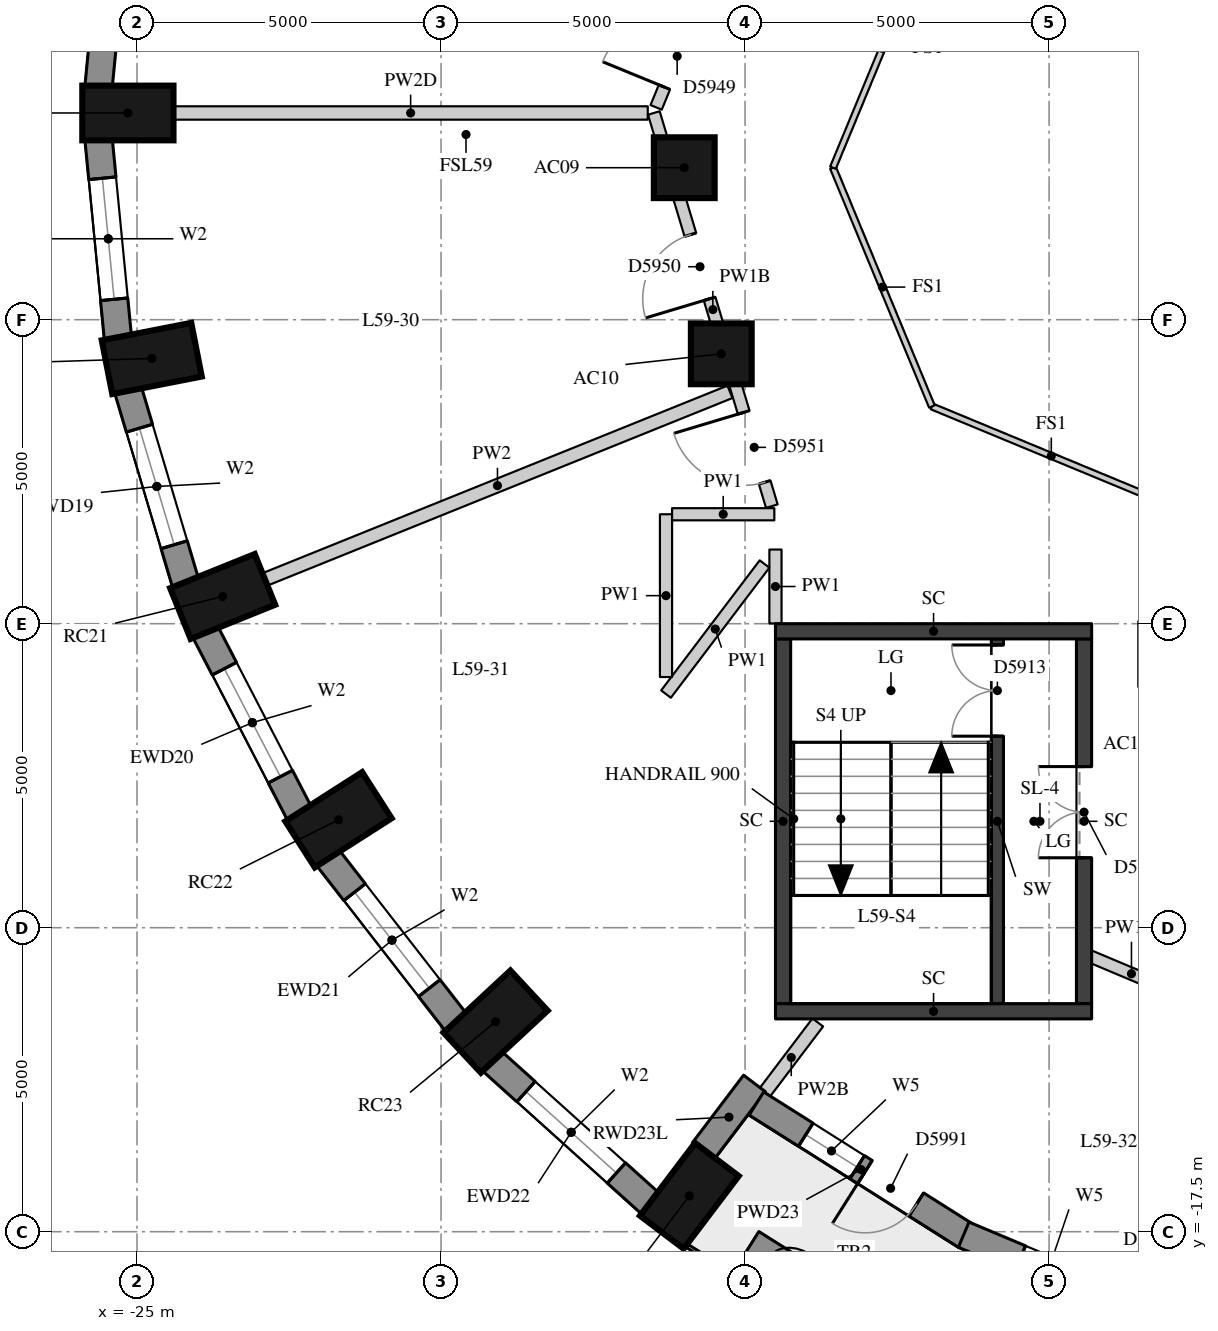
"""IFC4 building model, lengths in metres.
Left out: names, types, materials, properties, quantities, classifications, styles, units other than length and angle.
Written with IfcOpenShell. Run it as: python <this file> out.ifc"""

import sys

from ifc_helpers import new_model, si_unit, direction, frame, frame_2d, origin, origin_2d, place, context, subcontext, project, spatial, rectangle, extrude, element, fill, save


model = new_model("IFC4")
c1 = context("Model", 3, precision=1e-05, world=origin(), true_north=direction((0.0, 1.0)))
c2 = subcontext(c1, "Body", "Model", "MODEL_VIEW")
j1 = project(units=[si_unit("LENGTHUNIT", "METRE"), si_unit("PLANEANGLEUNIT", "RADIAN")], contexts=[c1])
p1 = place(None, origin())
s1 = spatial("IfcSite", under=j1, at=p1, CompositionType="ELEMENT")
p2 = place(p1, origin())
s2 = spatial("IfcBuilding", under=s1, at=p2, CompositionType="ELEMENT")
p3 = place(p2, frame((0.0, 0.0, 209.0)))
s3 = spatial("IfcBuildingStorey", under=s2, at=p3, CompositionType="ELEMENT", Elevation=209.0)
for number, where, z_axis, x_axis in (
    (1, (-25.15, 0.9, 0.0), (0.0, 0.0, 1.0), (-1.0, 0.0, 0.0)),
    (2, (-24.757, -3.137, 0.0), (0.0, 0.0, 1.0), (-0.981, -0.192, 0.0)),
    (3, (-23.591, -7.052, 0.0), (0.0, 0.0, 1.0), (-0.927, -0.374, 0.0)),
    (4, (-21.687, -10.725, 0.0), (0.0, 0.0, 1.0), (-0.842, -0.539, 0.0)),
    (5, (-19.102, -14.045, 0.0), (0.0, 0.0, 1.0), (-0.732, -0.681, 0.0)),
    (6, (-15.916, -16.911, 0.0), (0.0, 0.0, 1.0), (-0.604, -0.797, 0.0)),
):
    element("IfcColumn", number, at=place(p3, frame(where, z_axis=z_axis, x_axis=x_axis)), inside=s3, PredefinedType="COLUMN", context=c2, shape_type="SweptSolid", body=[
        extrude(rectangle(XDim=1.5, YDim=0.9, at=origin_2d()), origin(), (0.0, 0.0, 1.0), 3.3),
    ])
for number, where, z_axis, x_axis in (
    (7, (-16.0, 0.0, 0.0), (0.0, 0.0, 1.0), (1.0, 0.0, 0.0)),
    (8, (-15.391, -3.062, 0.0), (0.0, 0.0, 1.0), (1.0, 0.0, 0.0)),
):
    element("IfcColumn", number, at=place(p3, frame(where, z_axis=z_axis, x_axis=x_axis)), inside=s3, PredefinedType="COLUMN", context=c2, shape_type="SweptSolid", body=[
        extrude(rectangle(XDim=1.0, YDim=1.0, at=origin_2d()), origin(), (0.0, 0.0, 1.0), 3.3),
    ])
p4 = place(p3, frame((-25.313, 4.608, 0.0), z_axis=(0.0, 0.0, 1.0), x_axis=(-0.096824116835, -0.995301507283, 0.0)))
e9 = element("IfcWall", 9, at=p4, inside=s3, PredefinedType="SOLIDWALL", context=c2, shape_type="SweptSolid", body=[
    extrude(rectangle(XDim=3.293, YDim=0.45, at=frame_2d((1.646, 0.0))), origin(), (0.0, 0.0, 1.0), 3.02),
])
p5 = place(p4, frame((0.646, 0.0, 0.4)))
e10 = element("IfcOpeningElement", 10, at=p5, cuts=e9, PredefinedType="OPENING", context=c2, shape_type="SweptSolid", body=[
    extrude(rectangle(XDim=2.0, YDim=1.75, at=frame_2d((1.0, 0.875))), frame((0.0, 0.235, 0.0), z_axis=(0.0, -1.0, 0.0), x_axis=(1.0, 0.0, 0.0)), (0.0, 0.0, 1.0), 0.47),
])
p6 = place(p3, frame((-25.632, 0.47, 0.0), z_axis=(0.0, 0.0, 1.0), x_axis=(0.096816972749, -0.995302202242, 0.0)))
e11 = element("IfcWall", 11, at=p6, inside=s3, PredefinedType="SOLIDWALL", context=c2, shape_type="SweptSolid", body=[
    extrude(rectangle(XDim=3.293, YDim=0.45, at=frame_2d((1.646, 0.0))), origin(), (0.0, 0.0, 1.0), 3.02),
])
p7 = place(p6, frame((0.646, 0.0, 0.4)))
e12 = element("IfcOpeningElement", 12, at=p7, cuts=e11, PredefinedType="OPENING", context=c2, shape_type="SweptSolid", body=[
    extrude(rectangle(XDim=2.0, YDim=1.75, at=frame_2d((1.0, 0.875))), frame((0.0, 0.235, 0.0), z_axis=(0.0, -1.0, 0.0), x_axis=(1.0, 0.0, 0.0)), (0.0, 0.0, 1.0), 0.47),
])
p8 = place(p3, frame((-25.148, -3.652, 0.0), z_axis=(0.0, 0.0, 1.0), x_axis=(0.285444972963, -0.958395099847, 0.0)))
e13 = element("IfcWall", 13, at=p8, inside=s3, PredefinedType="SOLIDWALL", context=c2, shape_type="SweptSolid", body=[
    extrude(rectangle(XDim=3.32, YDim=0.45, at=frame_2d((1.66, 0.0))), origin(), (0.0, 0.0, 1.0), 3.02),
])
p9 = place(p8, frame((0.66, 0.0, 0.4)))
e14 = element("IfcOpeningElement", 14, at=p9, cuts=e13, PredefinedType="OPENING", context=c2, shape_type="SweptSolid", body=[
    extrude(rectangle(XDim=2.0, YDim=1.75, at=frame_2d((1.0, 0.875))), frame((0.0, 0.235, 0.0), z_axis=(0.0, -1.0, 0.0), x_axis=(1.0, 0.0, 0.0)), (0.0, 0.0, 1.0), 0.47),
])
p10 = place(p3, frame((-23.878, -7.632, 0.0), z_axis=(0.0, 0.0, 1.0), x_axis=(0.460232593174, -0.887798378113, 0.0)))
e15 = element("IfcWall", 15, at=p10, inside=s3, PredefinedType="SOLIDWALL", context=c2, shape_type="SweptSolid", body=[
    extrude(rectangle(XDim=3.371, YDim=0.45, at=frame_2d((1.685, 0.0))), origin(), (0.0, 0.0, 1.0), 3.02),
])
p11 = place(p10, frame((0.685, 0.0, 0.4)))
e16 = element("IfcOpeningElement", 16, at=p11, cuts=e15, PredefinedType="OPENING", context=c2, shape_type="SweptSolid", body=[
    extrude(rectangle(XDim=2.0, YDim=1.75, at=frame_2d((1.0, 0.875))), frame((0.0, 0.235, 0.0), z_axis=(0.0, -1.0, 0.0), x_axis=(1.0, 0.0, 0.0)), (0.0, 0.0, 1.0), 0.47),
])
p12 = place(p3, frame((-21.863, -11.348, 0.0), z_axis=(0.0, 0.0, 1.0), x_axis=(0.614255239631, -0.789107407509, 0.0)))
e17 = element("IfcWall", 17, at=p12, inside=s3, PredefinedType="SOLIDWALL", context=c2, shape_type="SweptSolid", body=[
    extrude(rectangle(XDim=3.438, YDim=0.45, at=frame_2d((1.719, 0.0))), origin(), (0.0, 0.0, 1.0), 3.02),
])
p13 = place(p12, frame((0.719, 0.0, 0.4)))
e18 = element("IfcOpeningElement", 18, at=p13, cuts=e17, PredefinedType="OPENING", context=c2, shape_type="SweptSolid", body=[
    extrude(rectangle(XDim=2.0, YDim=1.75, at=frame_2d((1.0, 0.875))), frame((0.0, 0.235, 0.0), z_axis=(0.0, -1.0, 0.0), x_axis=(1.0, 0.0, 0.0)), (0.0, 0.0, 1.0), 0.47),
])
p14 = place(p3, frame((-19.165, -14.69, 0.0), z_axis=(0.0, 0.0, 1.0), x_axis=(0.743442727602, -0.668799604348, 0.0)))
e19 = element("IfcWall", 19, at=p14, inside=s3, PredefinedType="SOLIDWALL", context=c2, shape_type="SweptSolid", body=[
    extrude(rectangle(XDim=3.513, YDim=0.45, at=frame_2d((1.756, 0.0))), origin(), (0.0, 0.0, 1.0), 3.02),
])
p15 = place(p14, frame((0.756, 0.0, 0.4)))
e20 = element("IfcOpeningElement", 20, at=p15, cuts=e19, PredefinedType="OPENING", context=c2, shape_type="SweptSolid", body=[
    extrude(rectangle(XDim=2.0, YDim=1.75, at=frame_2d((1.0, 0.875))), frame((0.0, 0.235, 0.0), z_axis=(0.0, -1.0, 0.0), x_axis=(1.0, 0.0, 0.0)), (0.0, 0.0, 1.0), 0.47),
])
p16 = place(p3, frame((-15.685, -16.17, 0.0), z_axis=(0.0, 0.0, 1.0), x_axis=(0.603644757989, 0.797253414011, 0.0)))
e21 = element("IfcWall", 21, at=p16, inside=s3, PredefinedType="SOLIDWALL", context=c2, shape_type="SweptSolid", body=[
    extrude(rectangle(XDim=1.391, YDim=0.45, at=frame_2d((0.695, 0.0))), origin(), (0.0, 0.0, 1.0), 2.57),
])
p17 = place(p3, frame((-14.813, -15.392, 0.0), z_axis=(0.0, 0.0, 1.0), x_axis=(0.84545185308, -0.534051649303, 0.0)))
e22 = element("IfcWall", 22, at=p17, inside=s3, PredefinedType="SOLIDWALL", context=c2, shape_type="SweptSolid", body=[
    extrude(rectangle(XDim=4.071, YDim=0.45, at=frame_2d((2.036, 0.0))), origin(), (0.0, 0.0, 1.0), 3.02),
])
p18 = place(p17, frame((0.961, 0.0, 0.4)))
e23 = element("IfcOpeningElement", 23, at=p18, cuts=e22, PredefinedType="OPENING", context=c2, shape_type="SweptSolid", body=[
    extrude(rectangle(XDim=1.0, YDim=1.75, at=frame_2d((0.5, 0.875))), frame((0.0, 0.235, 0.0), z_axis=(0.0, -1.0, 0.0), x_axis=(1.0, 0.0, 0.0)), (0.0, 0.0, 1.0), 0.47),
])
p19 = place(p17, frame((2.111, 0.0, 0.0)))
e24 = element("IfcOpeningElement", 24, at=p19, cuts=e22, PredefinedType="OPENING", context=c2, shape_type="SweptSolid", body=[
    extrude(rectangle(XDim=1.0, YDim=2.15, at=frame_2d((0.5, 1.075))), frame((0.0, 0.235, 0.0), z_axis=(0.0, -1.0, 0.0), x_axis=(1.0, 0.0, 0.0)), (0.0, 0.0, 1.0), 0.47),
])
p20 = place(p3, frame((-11.404, -17.549, 0.0), z_axis=(0.0, 0.0, 1.0), x_axis=(0.921751093055, -0.387782055351, 0.0)))
e25 = element("IfcWall", 25, at=p20, inside=s3, PredefinedType="SOLIDWALL", context=c2, shape_type="SweptSolid", body=[
    extrude(rectangle(XDim=4.168, YDim=0.45, at=frame_2d((2.084, 0.0))), origin(), (0.0, 0.0, 1.0), 3.02),
])
p21 = place(p20, frame((1.009, 0.0, 0.4)))
e26 = element("IfcOpeningElement", 26, at=p21, cuts=e25, PredefinedType="OPENING", context=c2, shape_type="SweptSolid", body=[
    extrude(rectangle(XDim=1.0, YDim=1.75, at=frame_2d((0.5, 0.875))), frame((0.0, 0.235, 0.0), z_axis=(0.0, -1.0, 0.0), x_axis=(1.0, 0.0, 0.0)), (0.0, 0.0, 1.0), 0.47),
])
p22 = place(p20, frame((2.159, 0.0, 0.0)))
e27 = element("IfcOpeningElement", 27, at=p22, cuts=e25, PredefinedType="OPENING", context=c2, shape_type="SweptSolid", body=[
    extrude(rectangle(XDim=1.0, YDim=2.15, at=frame_2d((0.5, 1.075))), frame((0.0, 0.235, 0.0), z_axis=(0.0, -1.0, 0.0), x_axis=(1.0, 0.0, 0.0)), (0.0, 0.0, 1.0), 0.47),
])
p23 = place(p3, frame((-14.96, -17.793, 0.0), z_axis=(0.0, 0.0, 1.0), x_axis=(0.846126379677, -0.532982316418, 0.0)))
e28 = element("IfcWall", 28, at=p23, inside=s3, PredefinedType="USERDEFINED", context=c2, shape_type="SweptSolid", body=[
    extrude(rectangle(XDim=1.8, YDim=0.7, at=frame_2d((0.9, 0.0))), origin(), (0.0, 0.0, 1.0), 0.75),
])
p24 = place(p3, frame((-10.85, -13.75, 0.0), z_axis=(0.0, 0.0, 1.0), x_axis=(0.0, 1.0, 0.0)))
e29 = element("IfcWall", 29, at=p24, inside=s3, PredefinedType="SHEAR", context=c2, shape_type="SweptSolid", body=[
    extrude(rectangle(XDim=6.0, YDim=0.2, at=frame_2d((3.0, 0.0))), origin(), (0.0, 0.0, 1.0), 3.02),
])
p25 = place(p24, frame((4.4, 0.0, 0.0)))
e30 = element("IfcOpeningElement", 30, at=p25, cuts=e29, PredefinedType="OPENING", context=c2, shape_type="SweptSolid", body=[
    extrude(rectangle(XDim=1.5, YDim=2.1, at=frame_2d((0.75, 1.05))), frame((0.0, 0.11, 0.0), z_axis=(0.0, -1.0, 0.0), x_axis=(1.0, 0.0, 0.0)), (0.0, 0.0, 1.0), 0.22),
])
p26 = place(p3, frame((-14.375, -13.75, -0.28), z_axis=(0.0, 0.0, 1.0), x_axis=(0.0, 1.0, 0.0)))
e31 = element("IfcWall", 31, at=p26, inside=s3, PredefinedType="SHEAR", context=c2, shape_type="SweptSolid", body=[
    extrude(rectangle(XDim=6.0, YDim=0.25, at=frame_2d((3.0, 0.0))), origin(), (0.0, 0.0, 1.0), 3.3),
])
p27 = place(p3, frame((-9.425, -13.75, -0.28), z_axis=(0.0, 0.0, 1.0), x_axis=(0.0, 1.0, 0.0)))
e32 = element("IfcWall", 32, at=p27, inside=s3, PredefinedType="SHEAR", context=c2, shape_type="SweptSolid", body=[
    extrude(rectangle(XDim=6.0, YDim=0.25, at=frame_2d((3.0, 0.0))), origin(), (0.0, 0.0, 1.0), 3.3),
])
p28 = place(p27, frame((2.4, 0.0, 0.28)))
e33 = element("IfcOpeningElement", 33, at=p28, cuts=e32, PredefinedType="OPENING", context=c2, shape_type="SweptSolid", body=[
    extrude(rectangle(XDim=1.5, YDim=2.1, at=frame_2d((0.75, 1.05))), frame((0.0, 0.135, 0.0), z_axis=(0.0, -1.0, 0.0), x_axis=(1.0, 0.0, 0.0)), (0.0, 0.0, 1.0), 0.27),
])
for number, where, z_axis, x_axis in (
    (34, (-14.5, -7.625, -0.28), (0.0, 0.0, 1.0), (1.0, 0.0, 0.0)),
    (35, (-14.5, -13.875, -0.28), (0.0, 0.0, 1.0), (1.0, 0.0, 0.0)),
):
    element("IfcWall", number, at=place(p3, frame(where, z_axis=z_axis, x_axis=x_axis)), inside=s3, PredefinedType="SHEAR", context=c2, shape_type="SweptSolid", body=[
        extrude(rectangle(XDim=5.2, YDim=0.25, at=frame_2d((2.6, 0.0))), origin(), (0.0, 0.0, 1.0), 3.3),
    ])
p29 = place(p3, frame((-7.83, -13.601, 0.0), z_axis=(0.0, 0.0, 1.0), x_axis=(-0.921793770535, 0.387680596112, 0.0)))
e36 = element("IfcWall", 36, at=p29, inside=s3, PredefinedType="PARTITIONING", context=c2, shape_type="SweptSolid", body=[
    extrude(rectangle(XDim=1.769, YDim=0.2, at=frame_2d((0.885, 0.0))), origin(), (0.0, 0.0, 1.0), 2.57),
])
p30 = place(p3, frame((-14.5, -7.496, 0.0), z_axis=(0.0, 0.0, 1.0), x_axis=(0.0, 1.0, 0.0)))
e37 = element("IfcWall", 37, at=p30, inside=s3, PredefinedType="PARTITIONING", context=c2, shape_type="SweptSolid", body=[
    extrude(rectangle(XDim=1.216, YDim=0.2, at=frame_2d((0.608, 0.0))), origin(), (0.0, 0.0, 1.0), 3.02),
])
p31 = place(p3, frame((-14.679, -6.518, 0.0), z_axis=(0.0, 0.0, 1.0), x_axis=(-0.603820908912, -0.797120009761, 0.0)))
e38 = element("IfcWall", 38, at=p31, inside=s3, PredefinedType="PARTITIONING", context=c2, shape_type="SweptSolid", body=[
    extrude(rectangle(XDim=2.684, YDim=0.2, at=frame_2d((1.342, 0.0))), origin(), (0.0, 0.0, 1.0), 3.02),
])
p32 = place(p3, frame((-16.3, -8.377, 0.0), z_axis=(0.0, 0.0, 1.0), x_axis=(0.0, 1.0, 0.0)))
e39 = element("IfcWall", 39, at=p32, inside=s3, PredefinedType="PARTITIONING", context=c2, shape_type="SweptSolid", body=[
    extrude(rectangle(XDim=2.677, YDim=0.2, at=frame_2d((1.339, 0.0))), origin(), (0.0, 0.0, 1.0), 3.02),
])
p33 = place(p3, frame((-16.2, -5.7, 0.0), z_axis=(0.0, 0.0, 1.0), x_axis=(1.0, 0.0, 0.0)))
e40 = element("IfcWall", 40, at=p33, inside=s3, PredefinedType="PARTITIONING", context=c2, shape_type="SweptSolid", body=[
    extrude(rectangle(XDim=1.681, YDim=0.2, at=frame_2d((0.841, 0.0))), origin(), (0.0, 0.0, 1.0), 3.02),
])
p34 = place(p3, frame((-14.56, -5.567, 0.0), z_axis=(0.0, 0.0, 1.0), x_axis=(-0.287410918602, 0.95780737305, 0.0)))
e41 = element("IfcWall", 41, at=p34, inside=s3, PredefinedType="PARTITIONING", context=c2, shape_type="SweptSolid", body=[
    extrude(rectangle(XDim=6.751, YDim=0.2, at=frame_2d((3.376, 0.0))), origin(), (0.0, 0.0, 1.0), 2.52),
])
p35 = place(p34, frame((3.561, 0.0, 0.0)))
e42 = element("IfcOpeningElement", 42, at=p35, cuts=e41, PredefinedType="OPENING", context=c2, shape_type="SweptSolid", body=[
    extrude(rectangle(XDim=1.1, YDim=2.1, at=frame_2d((0.55, 1.05))), frame((0.0, 0.11, 0.0), z_axis=(0.0, -1.0, 0.0), x_axis=(1.0, 0.0, 0.0)), (0.0, 0.0, 1.0), 0.22),
])
p36 = place(p34, frame((0.41, 0.0, 0.0)))
e43 = element("IfcOpeningElement", 43, at=p36, cuts=e41, PredefinedType="OPENING", context=c2, shape_type="SweptSolid", body=[
    extrude(rectangle(XDim=1.2, YDim=2.1, at=frame_2d((0.6, 1.05))), frame((0.0, 0.11, 0.0), z_axis=(0.0, -1.0, 0.0), x_axis=(1.0, 0.0, 0.0)), (0.0, 0.0, 1.0), 0.22),
])
p37 = place(p3, frame((-16.462, 0.993, 0.0), z_axis=(0.0, 0.0, 1.0), x_axis=(0.37991958703, 0.925019517303, 0.0)))
e44 = element("IfcWall", 44, at=p37, inside=s3, PredefinedType="PARTITIONING", context=c2, shape_type="SweptSolid", body=[
    extrude(rectangle(XDim=5.089, YDim=0.2, at=frame_2d((2.544, 0.0))), origin(), (0.0, 0.0, 1.0), 2.52),
])
p38 = place(p37, frame((0.36, 0.0, 0.0)))
e45 = element("IfcOpeningElement", 45, at=p38, cuts=e44, PredefinedType="OPENING", context=c2, shape_type="SweptSolid", body=[
    extrude(rectangle(XDim=1.1, YDim=2.1, at=frame_2d((0.55, 1.05))), frame((0.0, 0.11, 0.0), z_axis=(0.0, -1.0, 0.0), x_axis=(1.0, 0.0, 0.0)), (0.0, 0.0, 1.0), 0.22),
])
p39 = place(p3, frame((-24.4, 0.9, 0.0), z_axis=(0.0, 0.0, 1.0), x_axis=(1.0, 0.0, 0.0)))
e46 = element("IfcWall", 46, at=p39, inside=s3, PredefinedType="PARTITIONING", context=c2, shape_type="SweptSolid", body=[
    extrude(rectangle(XDim=7.8, YDim=0.22, at=frame_2d((3.9, 0.0))), origin(), (0.0, 0.0, 1.0), 2.47),
])
p40 = place(p3, frame((-22.896, -6.771, 0.0), z_axis=(0.0, 0.0, 1.0), x_axis=(0.92738233242, 0.374114968313, 0.0)))
e47 = element("IfcWall", 47, at=p40, inside=s3, PredefinedType="PARTITIONING", context=c2, shape_type="SweptSolid", body=[
    extrude(rectangle(XDim=8.246, YDim=0.22, at=frame_2d((4.123, 0.0))), origin(), (0.0, 0.0, 1.0), 3.02),
])
p41 = place(p3, frame((-14.677, -15.211, 0.0), z_axis=(0.0, 0.0, 1.0), x_axis=(0.603665965776, 0.797237355976, 0.0)))
e48 = element("IfcWall", 48, at=p41, inside=s3, PredefinedType="PARTITIONING", context=c2, shape_type="SweptSolid", body=[
    extrude(rectangle(XDim=1.447, YDim=0.22, at=frame_2d((0.723, 0.0))), origin(), (0.0, 0.0, 1.0), 2.57),
])
for number, where, z_axis, x_axis in (
    (49, (-8.0, -5.554, 0.0), (0.0, 0.0, 1.0), (-0.924, 0.383, 0.0)),
    (50, (-11.927, -3.927, 0.0), (0.0, 0.0, 1.0), (-0.383, 0.924, 0.0)),
    (51, (-13.554, 0.0, 0.0), (0.0, 0.0, 1.0), (0.383, 0.924, 0.0)),
):
    element("IfcWall", number, at=place(p3, frame(where, z_axis=z_axis, x_axis=x_axis)), inside=s3, PredefinedType="PARTITIONING", context=c2, shape_type="SweptSolid", body=[
        extrude(rectangle(XDim=4.251, YDim=0.1, at=frame_2d((2.125, 0.0))), origin(), (0.0, 0.0, 1.0), 3.02),
    ])
p42 = place(p7, origin())
e52 = element("IfcWindow", 52, at=p42, inside=s3, PartitioningType="SINGLE_PANEL", PredefinedType="WINDOW", context=c2, shape_type="SweptSolid", body=[
    extrude(rectangle(XDim=2.0, YDim=1.75, at=frame_2d((1.0, 0.875))), frame((0.0, 0.035, 0.0), z_axis=(0.0, -1.0, 0.0), x_axis=(1.0, 0.0, 0.0)), (0.0, 0.0, 1.0), 0.06),
])
fill(e12, e52)
p43 = place(p9, origin())
e53 = element("IfcWindow", 53, at=p43, inside=s3, PartitioningType="SINGLE_PANEL", PredefinedType="WINDOW", context=c2, shape_type="SweptSolid", body=[
    extrude(rectangle(XDim=2.0, YDim=1.75, at=frame_2d((1.0, 0.875))), frame((0.0, 0.035, 0.0), z_axis=(0.0, -1.0, 0.0), x_axis=(1.0, 0.0, 0.0)), (0.0, 0.0, 1.0), 0.06),
])
fill(e14, e53)
p44 = place(p11, origin())
e54 = element("IfcWindow", 54, at=p44, inside=s3, PartitioningType="SINGLE_PANEL", PredefinedType="WINDOW", context=c2, shape_type="SweptSolid", body=[
    extrude(rectangle(XDim=2.0, YDim=1.75, at=frame_2d((1.0, 0.875))), frame((0.0, 0.035, 0.0), z_axis=(0.0, -1.0, 0.0), x_axis=(1.0, 0.0, 0.0)), (0.0, 0.0, 1.0), 0.06),
])
fill(e16, e54)
p45 = place(p13, origin())
e55 = element("IfcWindow", 55, at=p45, inside=s3, PartitioningType="SINGLE_PANEL", PredefinedType="WINDOW", context=c2, shape_type="SweptSolid", body=[
    extrude(rectangle(XDim=2.0, YDim=1.75, at=frame_2d((1.0, 0.875))), frame((0.0, 0.035, 0.0), z_axis=(0.0, -1.0, 0.0), x_axis=(1.0, 0.0, 0.0)), (0.0, 0.0, 1.0), 0.06),
])
fill(e18, e55)
p46 = place(p15, origin())
e56 = element("IfcWindow", 56, at=p46, inside=s3, PartitioningType="SINGLE_PANEL", PredefinedType="WINDOW", context=c2, shape_type="SweptSolid", body=[
    extrude(rectangle(XDim=2.0, YDim=1.75, at=frame_2d((1.0, 0.875))), frame((0.0, 0.035, 0.0), z_axis=(0.0, -1.0, 0.0), x_axis=(1.0, 0.0, 0.0)), (0.0, 0.0, 1.0), 0.06),
])
fill(e20, e56)
p47 = place(p18, origin())
e57 = element("IfcWindow", 57, at=p47, inside=s3, PartitioningType="SINGLE_PANEL", PredefinedType="WINDOW", context=c2, shape_type="SweptSolid", body=[
    extrude(rectangle(XDim=1.0, YDim=1.75, at=frame_2d((0.5, 0.875))), frame((0.0, 0.035, 0.0), z_axis=(0.0, -1.0, 0.0), x_axis=(1.0, 0.0, 0.0)), (0.0, 0.0, 1.0), 0.06),
])
fill(e23, e57)
p48 = place(p19, frame((1.0, 0.0, 0.0), z_axis=(0.0, 0.0, 1.0), x_axis=(-1.0, 0.0, 0.0)))
e58 = element("IfcDoor", 58, at=p48, inside=s3, OperationType="SINGLE_SWING_RIGHT", PredefinedType="DOOR", context=c2, shape_type="SweptSolid", body=[
    extrude(rectangle(XDim=1.0, YDim=2.15, at=frame_2d((0.5, 1.075))), frame((0.0, 0.075, 0.0), z_axis=(0.0, -1.0, 0.0), x_axis=(1.0, 0.0, 0.0)), (0.0, 0.0, 1.0), 0.05),
])
fill(e24, e58)
p49 = place(p25, origin())
e59 = element("IfcDoor", 59, at=p49, inside=s3, OperationType="DOUBLE_DOOR_SINGLE_SWING", PredefinedType="DOOR", context=c2, shape_type="SweptSolid", body=[
    extrude(rectangle(XDim=1.5, YDim=2.1, at=frame_2d((0.75, 1.05))), frame((0.0, 0.025, 0.0), z_axis=(0.0, -1.0, 0.0), x_axis=(1.0, 0.0, 0.0)), (0.0, 0.0, 1.0), 0.05),
])
fill(e30, e59)
p50 = place(p28, origin())
e60 = element("IfcDoor", 60, at=p50, inside=s3, OperationType="DOUBLE_DOOR_SINGLE_SWING", PredefinedType="DOOR", context=c2, shape_type="SweptSolid", body=[
    extrude(rectangle(XDim=1.5, YDim=2.1, at=frame_2d((0.75, 1.05))), frame((0.0, 0.025, 0.0), z_axis=(0.0, -1.0, 0.0), x_axis=(1.0, 0.0, 0.0)), (0.0, 0.0, 1.0), 0.05),
])
fill(e33, e60)
p51 = place(p38, origin())
e61 = element("IfcDoor", 61, at=p51, inside=s3, OperationType="SINGLE_SWING_LEFT", PredefinedType="DOOR", context=c2, shape_type="SweptSolid", body=[
    extrude(rectangle(XDim=1.1, YDim=2.1, at=frame_2d((0.55, 1.05))), frame((0.0, 0.025, 0.0), z_axis=(0.0, -1.0, 0.0), x_axis=(1.0, 0.0, 0.0)), (0.0, 0.0, 1.0), 0.05),
])
fill(e45, e61)
p52 = place(p35, origin())
e62 = element("IfcDoor", 62, at=p52, inside=s3, OperationType="SINGLE_SWING_LEFT", PredefinedType="DOOR", context=c2, shape_type="SweptSolid", body=[
    extrude(rectangle(XDim=1.1, YDim=2.1, at=frame_2d((0.55, 1.05))), frame((0.0, 0.025, 0.0), z_axis=(0.0, -1.0, 0.0), x_axis=(1.0, 0.0, 0.0)), (0.0, 0.0, 1.0), 0.05),
])
fill(e42, e62)
p53 = place(p36, origin())
e63 = element("IfcDoor", 63, at=p53, inside=s3, OperationType="SINGLE_SWING_RIGHT", PredefinedType="DOOR", context=c2, shape_type="SweptSolid", body=[
    extrude(rectangle(XDim=1.2, YDim=2.1, at=frame_2d((0.6, 1.05))), frame((0.0, 0.025, 0.0), z_axis=(0.0, -1.0, 0.0), x_axis=(1.0, 0.0, 0.0)), (0.0, 0.0, 1.0), 0.05),
])
fill(e43, e63)
save(model, sys.argv[1])
